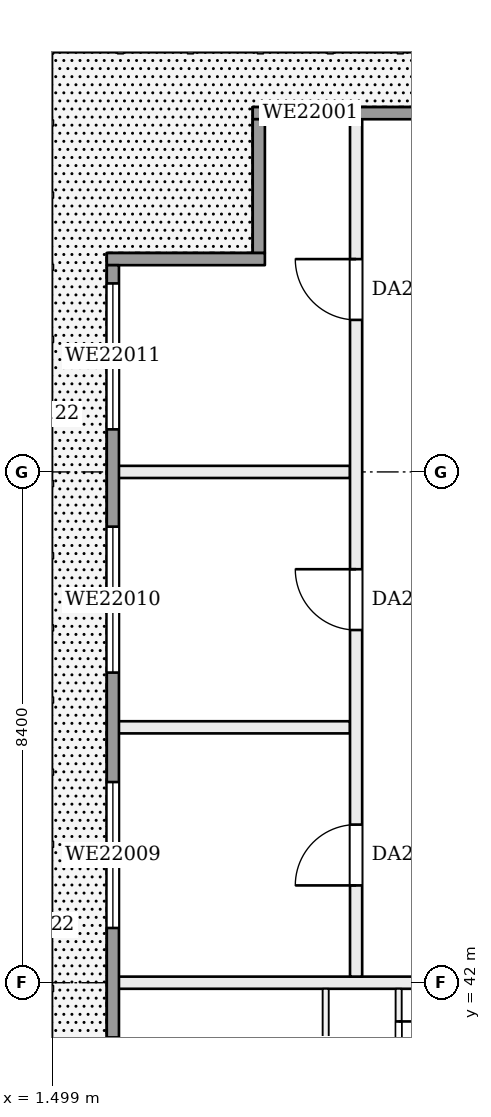
"""IFC4 building model, lengths in metres.
Left out: names, types, materials, properties, quantities, classifications, styles, units other than length and angle.
Written with IfcOpenShell. Run it as: python <this file> out.ifc"""

import sys

from ifc_helpers import new_model, si_unit, direction, frame, frame_2d, origin, place, context, subcontext, project, spatial, rectangle, extrude, element, fill, save


model = new_model("IFC4")
c1 = context("Model", 3, precision=1e-05, world=origin(), true_north=direction((0.0, 1.0)))
c2 = subcontext(c1, "Body", "Model", "MODEL_VIEW")
j1 = project(units=[si_unit("LENGTHUNIT", "METRE"), si_unit("PLANEANGLEUNIT", "RADIAN")], contexts=[c1])
p1 = place(None, origin())
s1 = spatial("IfcSite", under=j1, at=p1, CompositionType="ELEMENT")
p2 = place(p1, origin())
s2 = spatial("IfcBuilding", under=s1, at=p2, CompositionType="ELEMENT")
p3 = place(p2, frame((0.0, 0.0, 91.7)))
s3 = spatial("IfcBuildingStorey", under=s2, at=p3, CompositionType="ELEMENT", Elevation=91.7)
p4 = place(p3, frame((2.5, 42.0, 0.0), z_axis=(0.0, 0.0, 1.0), x_axis=(1.0, 0.0, 0.0)))
e1 = element("IfcWall", 1, at=p4, inside=s3, PredefinedType="PARTITIONING", context=c2, shape_type="SweptSolid", body=[
    extrude(rectangle(XDim=5.9, YDim=0.2, at=frame_2d((2.95, 0.0))), origin(), (0.0, 0.0, 1.0), 3.22),
])
for number, where, z_axis, x_axis in (
    (2, (2.5, 46.2, 0.0), (0.0, 0.0, 1.0), (1.0, 0.0, 0.0)),
    (3, (2.5, 50.4, 0.0), (0.0, 0.0, 1.0), (1.0, 0.0, 0.0)),
):
    element("IfcWall", number, at=place(p3, frame(where, z_axis=z_axis, x_axis=x_axis)), inside=s3, PredefinedType="PARTITIONING", context=c2, shape_type="SweptSolid", body=[
        extrude(rectangle(XDim=3.9, YDim=0.2, at=frame_2d((1.95, 0.0))), origin(), (0.0, 0.0, 1.0), 3.22),
    ])
p5 = place(p3, frame((6.0, 21.0, 0.0), z_axis=(0.0, 0.0, 1.0), x_axis=(0.0, 1.0, 0.0)))
e4 = element("IfcWall", 4, at=p5, inside=s3, PredefinedType="PARTITIONING", context=c2, shape_type="SweptSolid", body=[
    extrude(rectangle(XDim=20.9, YDim=0.1, at=frame_2d((10.45, 0.0))), origin(), (0.0, 0.0, 1.0), 3.22),
])
p6 = place(p5, frame((1.6, 0.0, 0.0)))
e5 = element("IfcOpeningElement", 5, at=p6, cuts=e4, PredefinedType="OPENING", context=c2, shape_type="SweptSolid", body=[
    extrude(rectangle(XDim=0.9, YDim=2.1, at=frame_2d((0.45, 1.05))), frame((0.0, 0.06, 0.0), z_axis=(0.0, -1.0, 0.0), x_axis=(1.0, 0.0, 0.0)), (0.0, 0.0, 1.0), 0.12),
])
p7 = place(p5, frame((5.8, 0.0, 0.0)))
e6 = element("IfcOpeningElement", 6, at=p7, cuts=e4, PredefinedType="OPENING", context=c2, shape_type="SweptSolid", body=[
    extrude(rectangle(XDim=0.9, YDim=2.1, at=frame_2d((0.45, 1.05))), frame((0.0, 0.06, 0.0), z_axis=(0.0, -1.0, 0.0), x_axis=(1.0, 0.0, 0.0)), (0.0, 0.0, 1.0), 0.12),
])
p8 = place(p5, frame((10.0, 0.0, 0.0)))
e7 = element("IfcOpeningElement", 7, at=p8, cuts=e4, PredefinedType="OPENING", context=c2, shape_type="SweptSolid", body=[
    extrude(rectangle(XDim=0.9, YDim=2.1, at=frame_2d((0.45, 1.05))), frame((0.0, 0.06, 0.0), z_axis=(0.0, -1.0, 0.0), x_axis=(1.0, 0.0, 0.0)), (0.0, 0.0, 1.0), 0.12),
])
p9 = place(p5, frame((14.2, 0.0, 0.0)))
e8 = element("IfcOpeningElement", 8, at=p9, cuts=e4, PredefinedType="OPENING", context=c2, shape_type="SweptSolid", body=[
    extrude(rectangle(XDim=0.9, YDim=2.1, at=frame_2d((0.45, 1.05))), frame((0.0, 0.06, 0.0), z_axis=(0.0, -1.0, 0.0), x_axis=(1.0, 0.0, 0.0)), (0.0, 0.0, 1.0), 0.12),
])
p10 = place(p5, frame((18.4, 0.0, 0.0)))
e9 = element("IfcOpeningElement", 9, at=p10, cuts=e4, PredefinedType="OPENING", context=c2, shape_type="SweptSolid", body=[
    extrude(rectangle(XDim=0.9, YDim=2.1, at=frame_2d((0.45, 1.05))), frame((0.0, 0.06, 0.0), z_axis=(0.0, -1.0, 0.0), x_axis=(1.0, 0.0, 0.0)), (0.0, 0.0, 1.0), 0.12),
])
p11 = place(p3, frame((6.5, 42.1, 0.0), z_axis=(0.0, 0.0, 1.0), x_axis=(0.0, 1.0, 0.0)))
e10 = element("IfcWall", 10, at=p11, inside=s3, PredefinedType="PARTITIONING", context=c2, shape_type="SweptSolid", body=[
    extrude(rectangle(XDim=14.2, YDim=0.2, at=frame_2d((7.1, 0.0))), origin(), (0.0, 0.0, 1.0), 3.22),
])
p12 = place(p11, frame((1.5, 0.0, 0.0)))
e11 = element("IfcOpeningElement", 11, at=p12, cuts=e10, PredefinedType="OPENING", context=c2, shape_type="SweptSolid", body=[
    extrude(rectangle(XDim=1.0, YDim=2.1, at=frame_2d((0.5, 1.05))), frame((0.0, 0.11, 0.0), z_axis=(0.0, -1.0, 0.0), x_axis=(1.0, 0.0, 0.0)), (0.0, 0.0, 1.0), 0.22),
])
p13 = place(p11, frame((5.7, 0.0, 0.0)))
e12 = element("IfcOpeningElement", 12, at=p13, cuts=e10, PredefinedType="OPENING", context=c2, shape_type="SweptSolid", body=[
    extrude(rectangle(XDim=1.0, YDim=2.1, at=frame_2d((0.5, 1.05))), frame((0.0, 0.11, 0.0), z_axis=(0.0, -1.0, 0.0), x_axis=(1.0, 0.0, 0.0)), (0.0, 0.0, 1.0), 0.22),
])
p14 = place(p11, frame((10.8, 0.0, 0.0)))
e13 = element("IfcOpeningElement", 13, at=p14, cuts=e10, PredefinedType="OPENING", context=c2, shape_type="SweptSolid", body=[
    extrude(rectangle(XDim=1.0, YDim=2.1, at=frame_2d((0.5, 1.05))), frame((0.0, 0.11, 0.0), z_axis=(0.0, -1.0, 0.0), x_axis=(1.0, 0.0, 0.0)), (0.0, 0.0, 1.0), 0.22),
])
p15 = place(p3, frame((7.2, 21.0, 0.0), z_axis=(0.0, 0.0, 1.0), x_axis=(0.0, 1.0, 0.0)))
e14 = element("IfcWall", 14, at=p15, inside=s3, PredefinedType="PARTITIONING", context=c2, shape_type="SweptSolid", body=[
    extrude(rectangle(XDim=20.9, YDim=0.1, at=frame_2d((10.45, 0.0))), origin(), (0.0, 0.0, 1.0), 3.22),
])
p16 = place(p15, frame((0.7, 0.0, 0.0)))
e15 = element("IfcOpeningElement", 15, at=p16, cuts=e14, PredefinedType="OPENING", context=c2, shape_type="SweptSolid", body=[
    extrude(rectangle(XDim=0.9, YDim=2.1, at=frame_2d((0.45, 1.05))), frame((0.0, 0.06, 0.0), z_axis=(0.0, -1.0, 0.0), x_axis=(1.0, 0.0, 0.0)), (0.0, 0.0, 1.0), 0.12),
])
p17 = place(p15, frame((2.838, 0.0, 0.0)))
e16 = element("IfcOpeningElement", 16, at=p17, cuts=e14, PredefinedType="OPENING", context=c2, shape_type="SweptSolid", body=[
    extrude(rectangle(XDim=0.9, YDim=2.1, at=frame_2d((0.45, 1.05))), frame((0.0, 0.06, 0.0), z_axis=(0.0, -1.0, 0.0), x_axis=(1.0, 0.0, 0.0)), (0.0, 0.0, 1.0), 0.12),
])
p18 = place(p15, frame((6.375, 0.0, 0.0)))
e17 = element("IfcOpeningElement", 17, at=p18, cuts=e14, PredefinedType="OPENING", context=c2, shape_type="SweptSolid", body=[
    extrude(rectangle(XDim=0.9, YDim=2.1, at=frame_2d((0.45, 1.05))), frame((0.0, 0.06, 0.0), z_axis=(0.0, -1.0, 0.0), x_axis=(1.0, 0.0, 0.0)), (0.0, 0.0, 1.0), 0.12),
])
p19 = place(p15, frame((9.113, 0.0, 0.0)))
e18 = element("IfcOpeningElement", 18, at=p19, cuts=e14, PredefinedType="OPENING", context=c2, shape_type="SweptSolid", body=[
    extrude(rectangle(XDim=0.9, YDim=2.1, at=frame_2d((0.45, 1.05))), frame((0.0, 0.06, 0.0), z_axis=(0.0, -1.0, 0.0), x_axis=(1.0, 0.0, 0.0)), (0.0, 0.0, 1.0), 0.12),
])
p20 = place(p15, frame((11.25, 0.0, 0.0)))
e19 = element("IfcOpeningElement", 19, at=p20, cuts=e14, PredefinedType="OPENING", context=c2, shape_type="SweptSolid", body=[
    extrude(rectangle(XDim=0.9, YDim=2.1, at=frame_2d((0.45, 1.05))), frame((0.0, 0.06, 0.0), z_axis=(0.0, -1.0, 0.0), x_axis=(1.0, 0.0, 0.0)), (0.0, 0.0, 1.0), 0.12),
])
p21 = place(p15, frame((14.288, 0.0, 0.0)))
e20 = element("IfcOpeningElement", 20, at=p21, cuts=e14, PredefinedType="OPENING", context=c2, shape_type="SweptSolid", body=[
    extrude(rectangle(XDim=0.9, YDim=2.1, at=frame_2d((0.45, 1.05))), frame((0.0, 0.06, 0.0), z_axis=(0.0, -1.0, 0.0), x_axis=(1.0, 0.0, 0.0)), (0.0, 0.0, 1.0), 0.12),
])
p22 = place(p15, frame((17.025, 0.0, 0.0)))
e21 = element("IfcOpeningElement", 21, at=p22, cuts=e14, PredefinedType="OPENING", context=c2, shape_type="SweptSolid", body=[
    extrude(rectangle(XDim=0.9, YDim=2.1, at=frame_2d((0.45, 1.05))), frame((0.0, 0.06, 0.0), z_axis=(0.0, -1.0, 0.0), x_axis=(1.0, 0.0, 0.0)), (0.0, 0.0, 1.0), 0.12),
])
p23 = place(p15, frame((19.463, 0.0, 0.0)))
e22 = element("IfcOpeningElement", 22, at=p23, cuts=e14, PredefinedType="OPENING", context=c2, shape_type="SweptSolid", body=[
    extrude(rectangle(XDim=0.9, YDim=2.1, at=frame_2d((0.45, 1.05))), frame((0.0, 0.06, 0.0), z_axis=(0.0, -1.0, 0.0), x_axis=(1.0, 0.0, 0.0)), (0.0, 0.0, 1.0), 0.12),
])
p24 = place(p3, frame((8.4, 56.3, 0.0), z_axis=(0.0, 0.0, 1.0), x_axis=(-1.0, 0.0, 0.0)))
e23 = element("IfcWall", 23, at=p24, inside=s3, PredefinedType="SOLIDWALL", context=c2, shape_type="SweptSolid", body=[
    extrude(rectangle(XDim=3.6, YDim=0.2, at=frame_2d((1.8, 0.0))), origin(), (0.0, 0.0, 1.0), 3.22),
])
p25 = place(p24, frame((2.0, 0.0, 0.9)))
e24 = element("IfcOpeningElement", 24, at=p25, cuts=e23, PredefinedType="OPENING", context=c2, shape_type="SweptSolid", body=[
    extrude(rectangle(XDim=1.3, YDim=1.5, at=frame_2d((0.65, 0.75))), frame((0.0, 0.11, 0.0), z_axis=(0.0, -1.0, 0.0), x_axis=(1.0, 0.0, 0.0)), (0.0, 0.0, 1.0), 0.22),
])
p26 = place(p3, frame((4.9, 56.2, 0.0), z_axis=(0.0, 0.0, 1.0), x_axis=(0.0, -1.0, 0.0)))
e25 = element("IfcWall", 25, at=p26, inside=s3, PredefinedType="SOLIDWALL", context=c2, shape_type="SweptSolid", body=[
    extrude(rectangle(XDim=2.2, YDim=0.2, at=frame_2d((1.1, 0.0))), origin(), (0.0, 0.0, 1.0), 3.22),
])
p27 = place(p3, frame((5.0, 53.9, 0.0), z_axis=(0.0, 0.0, 1.0), x_axis=(-1.0, 0.0, 0.0)))
e26 = element("IfcWall", 26, at=p27, inside=s3, PredefinedType="SOLIDWALL", context=c2, shape_type="SweptSolid", body=[
    extrude(rectangle(XDim=2.6, YDim=0.2, at=frame_2d((1.3, 0.0))), origin(), (0.0, 0.0, 1.0), 3.22),
])
p28 = place(p3, frame((2.5, 53.8, 0.0), z_axis=(0.0, 0.0, 1.0), x_axis=(0.0, -1.0, 0.0)))
e27 = element("IfcWall", 27, at=p28, inside=s3, PredefinedType="SOLIDWALL", context=c2, shape_type="SweptSolid", body=[
    extrude(rectangle(XDim=40.4, YDim=0.2, at=frame_2d((20.2, 0.0))), origin(), (0.0, 0.0, 1.0), 3.22),
])
p29 = place(p28, frame((37.7, 0.0, 0.9)))
e28 = element("IfcOpeningElement", 28, at=p29, cuts=e27, PredefinedType="OPENING", context=c2, shape_type="SweptSolid", body=[
    extrude(rectangle(XDim=2.4, YDim=1.5, at=frame_2d((1.2, 0.75))), frame((0.0, 0.11, 0.0), z_axis=(0.0, -1.0, 0.0), x_axis=(1.0, 0.0, 0.0)), (0.0, 0.0, 1.0), 0.22),
])
p30 = place(p28, frame((33.7, 0.0, 0.9)))
e29 = element("IfcOpeningElement", 29, at=p30, cuts=e27, PredefinedType="OPENING", context=c2, shape_type="SweptSolid", body=[
    extrude(rectangle(XDim=2.4, YDim=1.5, at=frame_2d((1.2, 0.75))), frame((0.0, 0.11, 0.0), z_axis=(0.0, -1.0, 0.0), x_axis=(1.0, 0.0, 0.0)), (0.0, 0.0, 1.0), 0.22),
])
p31 = place(p28, frame((29.5, 0.0, 0.0)))
e30 = element("IfcOpeningElement", 30, at=p31, cuts=e27, PredefinedType="OPENING", context=c2, shape_type="SweptSolid", body=[
    extrude(rectangle(XDim=2.4, YDim=2.2, at=frame_2d((1.2, 1.1))), frame((0.0, 0.11, 0.0), z_axis=(0.0, -1.0, 0.0), x_axis=(1.0, 0.0, 0.0)), (0.0, 0.0, 1.0), 0.22),
])
p32 = place(p28, frame((25.3, 0.0, 0.9)))
e31 = element("IfcOpeningElement", 31, at=p32, cuts=e27, PredefinedType="OPENING", context=c2, shape_type="SweptSolid", body=[
    extrude(rectangle(XDim=2.4, YDim=1.5, at=frame_2d((1.2, 0.75))), frame((0.0, 0.11, 0.0), z_axis=(0.0, -1.0, 0.0), x_axis=(1.0, 0.0, 0.0)), (0.0, 0.0, 1.0), 0.22),
])
p33 = place(p28, frame((21.1, 0.0, 0.9)))
e32 = element("IfcOpeningElement", 32, at=p33, cuts=e27, PredefinedType="OPENING", context=c2, shape_type="SweptSolid", body=[
    extrude(rectangle(XDim=2.4, YDim=1.5, at=frame_2d((1.2, 0.75))), frame((0.0, 0.11, 0.0), z_axis=(0.0, -1.0, 0.0), x_axis=(1.0, 0.0, 0.0)), (0.0, 0.0, 1.0), 0.22),
])
p34 = place(p28, frame((16.9, 0.0, 0.9)))
e33 = element("IfcOpeningElement", 33, at=p34, cuts=e27, PredefinedType="OPENING", context=c2, shape_type="SweptSolid", body=[
    extrude(rectangle(XDim=2.4, YDim=1.5, at=frame_2d((1.2, 0.75))), frame((0.0, 0.11, 0.0), z_axis=(0.0, -1.0, 0.0), x_axis=(1.0, 0.0, 0.0)), (0.0, 0.0, 1.0), 0.22),
])
p35 = place(p28, frame((12.7, 0.0, 0.9)))
e34 = element("IfcOpeningElement", 34, at=p35, cuts=e27, PredefinedType="OPENING", context=c2, shape_type="SweptSolid", body=[
    extrude(rectangle(XDim=2.4, YDim=1.5, at=frame_2d((1.2, 0.75))), frame((0.0, 0.11, 0.0), z_axis=(0.0, -1.0, 0.0), x_axis=(1.0, 0.0, 0.0)), (0.0, 0.0, 1.0), 0.22),
])
p36 = place(p28, frame((8.5, 0.0, 0.9)))
e35 = element("IfcOpeningElement", 35, at=p36, cuts=e27, PredefinedType="OPENING", context=c2, shape_type="SweptSolid", body=[
    extrude(rectangle(XDim=2.4, YDim=1.5, at=frame_2d((1.2, 0.75))), frame((0.0, 0.11, 0.0), z_axis=(0.0, -1.0, 0.0), x_axis=(1.0, 0.0, 0.0)), (0.0, 0.0, 1.0), 0.22),
])
p37 = place(p28, frame((4.3, 0.0, 0.9)))
e36 = element("IfcOpeningElement", 36, at=p37, cuts=e27, PredefinedType="OPENING", context=c2, shape_type="SweptSolid", body=[
    extrude(rectangle(XDim=2.4, YDim=1.5, at=frame_2d((1.2, 0.75))), frame((0.0, 0.11, 0.0), z_axis=(0.0, -1.0, 0.0), x_axis=(1.0, 0.0, 0.0)), (0.0, 0.0, 1.0), 0.22),
])
p38 = place(p28, frame((0.3, 0.0, 0.9)))
e37 = element("IfcOpeningElement", 37, at=p38, cuts=e27, PredefinedType="OPENING", context=c2, shape_type="SweptSolid", body=[
    extrude(rectangle(XDim=2.4, YDim=1.5, at=frame_2d((1.2, 0.75))), frame((0.0, 0.11, 0.0), z_axis=(0.0, -1.0, 0.0), x_axis=(1.0, 0.0, 0.0)), (0.0, 0.0, 1.0), 0.22),
])
p39 = place(p12, origin())
e38 = element("IfcDoor", 38, at=p39, inside=s3, OperationType="SINGLE_SWING_LEFT", PredefinedType="DOOR", context=c2, shape_type="SweptSolid", body=[
    extrude(rectangle(XDim=1.0, YDim=2.1, at=frame_2d((0.5, 1.05))), frame((0.0, 0.025, 0.0), z_axis=(0.0, -1.0, 0.0), x_axis=(1.0, 0.0, 0.0)), (0.0, 0.0, 1.0), 0.05),
])
fill(e11, e38)
p40 = place(p13, origin())
e39 = element("IfcDoor", 39, at=p40, inside=s3, OperationType="SINGLE_SWING_RIGHT", PredefinedType="DOOR", context=c2, shape_type="SweptSolid", body=[
    extrude(rectangle(XDim=1.0, YDim=2.1, at=frame_2d((0.5, 1.05))), frame((0.0, 0.025, 0.0), z_axis=(0.0, -1.0, 0.0), x_axis=(1.0, 0.0, 0.0)), (0.0, 0.0, 1.0), 0.05),
])
fill(e12, e39)
p41 = place(p14, origin())
e40 = element("IfcDoor", 40, at=p41, inside=s3, OperationType="SINGLE_SWING_RIGHT", PredefinedType="DOOR", context=c2, shape_type="SweptSolid", body=[
    extrude(rectangle(XDim=1.0, YDim=2.1, at=frame_2d((0.5, 1.05))), frame((0.0, 0.025, 0.0), z_axis=(0.0, -1.0, 0.0), x_axis=(1.0, 0.0, 0.0)), (0.0, 0.0, 1.0), 0.05),
])
fill(e13, e40)
p42 = place(p23, frame((0.9, 0.0, 0.0), z_axis=(0.0, 0.0, 1.0), x_axis=(-1.0, 0.0, 0.0)))
e41 = element("IfcDoor", 41, at=p42, inside=s3, OperationType="SINGLE_SWING_LEFT", PredefinedType="DOOR", context=c2, shape_type="SweptSolid", body=[
    extrude(rectangle(XDim=0.9, YDim=2.1, at=frame_2d((0.45, 1.05))), frame((0.0, 0.025, 0.0), z_axis=(0.0, -1.0, 0.0), x_axis=(1.0, 0.0, 0.0)), (0.0, 0.0, 1.0), 0.05),
])
fill(e22, e41)
p43 = place(p25, origin())
e42 = element("IfcWindow", 42, at=p43, inside=s3, PartitioningType="SINGLE_PANEL", PredefinedType="WINDOW", context=c2, shape_type="SweptSolid", body=[
    extrude(rectangle(XDim=1.3, YDim=1.5, at=frame_2d((0.65, 0.75))), frame((0.0, 0.03, 0.0), z_axis=(0.0, -1.0, 0.0), x_axis=(1.0, 0.0, 0.0)), (0.0, 0.0, 1.0), 0.06),
])
fill(e24, e42)
p44 = place(p36, origin())
e43 = element("IfcWindow", 43, at=p44, inside=s3, PartitioningType="SINGLE_PANEL", PredefinedType="WINDOW", context=c2, shape_type="SweptSolid", body=[
    extrude(rectangle(XDim=2.4, YDim=1.5, at=frame_2d((1.2, 0.75))), frame((0.0, 0.03, 0.0), z_axis=(0.0, -1.0, 0.0), x_axis=(1.0, 0.0, 0.0)), (0.0, 0.0, 1.0), 0.06),
])
fill(e35, e43)
p45 = place(p37, origin())
e44 = element("IfcWindow", 44, at=p45, inside=s3, PartitioningType="SINGLE_PANEL", PredefinedType="WINDOW", context=c2, shape_type="SweptSolid", body=[
    extrude(rectangle(XDim=2.4, YDim=1.5, at=frame_2d((1.2, 0.75))), frame((0.0, 0.03, 0.0), z_axis=(0.0, -1.0, 0.0), x_axis=(1.0, 0.0, 0.0)), (0.0, 0.0, 1.0), 0.06),
])
fill(e36, e44)
p46 = place(p38, origin())
e45 = element("IfcWindow", 45, at=p46, inside=s3, PartitioningType="SINGLE_PANEL", PredefinedType="WINDOW", context=c2, shape_type="SweptSolid", body=[
    extrude(rectangle(XDim=2.4, YDim=1.5, at=frame_2d((1.2, 0.75))), frame((0.0, 0.03, 0.0), z_axis=(0.0, -1.0, 0.0), x_axis=(1.0, 0.0, 0.0)), (0.0, 0.0, 1.0), 0.06),
])
fill(e37, e45)
save(model, sys.argv[1])
